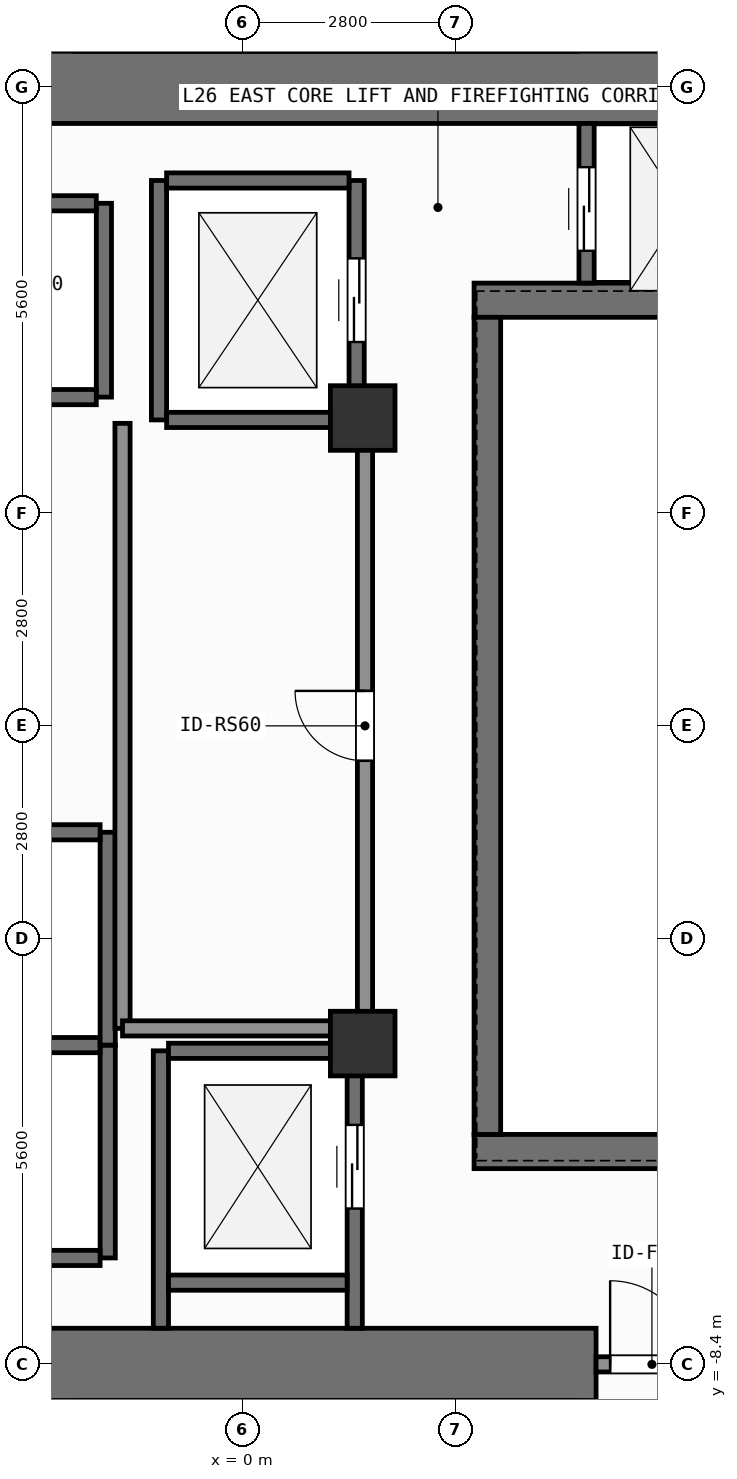
"""IFC4 building model, lengths in metres.
Left out: names, types, materials, properties, quantities, classifications, styles, units other than length and angle.
Written with IfcOpenShell. Run it as: python <this file> out.ifc"""

import sys

from ifc_helpers import new_model, si_unit, direction, frame, frame_2d, origin, origin_2d, place, context, subcontext, project, spatial, rectangle, extrude, element, fill, save


model = new_model("IFC4")
c1 = context("Model", 3, precision=1e-05, world=origin(), true_north=direction((0.0, 1.0)))
c2 = subcontext(c1, "Body", "Model", "MODEL_VIEW")
j1 = project(units=[si_unit("LENGTHUNIT", "METRE"), si_unit("PLANEANGLEUNIT", "RADIAN")], contexts=[c1])
p1 = place(None, origin())
s1 = spatial("IfcSite", under=j1, at=p1, CompositionType="ELEMENT")
p2 = place(p1, origin())
s2 = spatial("IfcBuilding", under=s1, at=p2, CompositionType="ELEMENT")
p3 = place(p2, frame((0.0, 0.0, 104.7)))
s3 = spatial("IfcBuildingStorey", under=s2, at=p3, CompositionType="ELEMENT", Elevation=104.7)
p4 = place(p3, frame((-2.62, -8.4, 0.0), z_axis=(0.0, 0.0, 1.0), x_axis=(1.0, 0.0, 0.0)))
e1 = element("IfcWall", 1, at=p4, inside=s3, PredefinedType="SHEAR", context=c2, shape_type="SweptSolid", body=[
    extrude(rectangle(XDim=7.27, YDim=0.95, at=frame_2d((3.635, 0.0))), origin(), (0.0, 0.0, 1.0), 3.9),
])
p5 = place(p3, frame((-7.55, 8.4, 0.0), z_axis=(0.0, 0.0, 1.0), x_axis=(1.0, 0.0, 0.0)))
e2 = element("IfcWall", 2, at=p5, inside=s3, PredefinedType="SHEAR", context=c2, shape_type="SweptSolid", body=[
    extrude(rectangle(XDim=16.425, YDim=0.95, at=frame_2d((8.212, 0.0))), origin(), (0.0, 0.0, 1.0), 3.9),
])
for number, where, z_axis, x_axis in (
    (3, (3.045, -5.6, 0.0), (0.0, 0.0, 1.0), (1.0, 0.0, 0.0)),
    (4, (3.045, 5.6, 0.0), (0.0, 0.0, 1.0), (1.0, 0.0, 0.0)),
):
    element("IfcWall", number, at=place(p3, frame(where, z_axis=z_axis, x_axis=x_axis)), inside=s3, PredefinedType="SHEAR", context=c2, shape_type="SweptSolid", body=[
        extrude(rectangle(XDim=5.83, YDim=0.45, at=frame_2d((2.915, 0.0))), origin(), (0.0, 0.0, 1.0), 3.9),
    ])
p6 = place(p3, frame((3.22, -5.375, 0.0), z_axis=(0.0, 0.0, 1.0), x_axis=(0.0, 1.0, 0.0)))
e5 = element("IfcWall", 5, at=p6, inside=s3, PredefinedType="SHEAR", context=c2, shape_type="SweptSolid", body=[
    extrude(rectangle(XDim=10.75, YDim=0.35, at=frame_2d((5.375, 0.0))), origin(), (0.0, 0.0, 1.0), 3.9),
])
for number, where, z_axis, x_axis in (
    (6, (1.58, -4.18, 0.0), (0.0, 0.0, 1.0), (1.0, 0.0, 0.0)),
    (7, (1.58, 4.05, 0.0), (0.0, 0.0, 1.0), (1.0, 0.0, 0.0)),
):
    element("IfcColumn", number, at=place(p3, frame(where, z_axis=z_axis, x_axis=x_axis)), inside=s3, PredefinedType="COLUMN", context=c2, shape_type="SweptSolid", body=[
        extrude(rectangle(XDim=0.85, YDim=0.85, at=origin_2d()), origin(), (0.0, 0.0, 1.0), 3.9),
    ])
p7 = place(p3, frame((-1.825, 4.325, 0.0), z_axis=(0.0, 0.0, 1.0), x_axis=(0.0, 1.0, 0.0)))
e8 = element("IfcWall", 8, at=p7, inside=s3, PredefinedType="SHEAR", context=c2, shape_type="SweptSolid", body=[
    extrude(rectangle(XDim=2.55, YDim=0.2, at=frame_2d((1.275, 0.0))), origin(), (0.0, 0.0, 1.0), 3.62),
])
for number, where, z_axis, x_axis in (
    (9, (-4.275, 4.325, 0.0), (0.0, 0.0, 1.0), (1.0, 0.0, 0.0)),
    (10, (-4.275, 6.875, 0.0), (0.0, 0.0, 1.0), (1.0, 0.0, 0.0)),
):
    element("IfcWall", number, at=place(p3, frame(where, z_axis=z_axis, x_axis=x_axis)), inside=s3, PredefinedType="SHEAR", context=c2, shape_type="SweptSolid", body=[
        extrude(rectangle(XDim=2.35, YDim=0.2, at=frame_2d((1.175, 0.0))), origin(), (0.0, 0.0, 1.0), 3.62),
    ])
p8 = place(p3, frame((-1.775, -7.0, 0.0), z_axis=(0.0, 0.0, 1.0), x_axis=(0.0, 1.0, 0.0)))
e11 = element("IfcWall", 11, at=p8, inside=s3, PredefinedType="SHEAR", context=c2, shape_type="SweptSolid", body=[
    extrude(rectangle(XDim=2.8, YDim=0.2, at=frame_2d((1.4, 0.0))), origin(), (0.0, 0.0, 1.0), 3.62),
])
for number, where, z_axis, x_axis in (
    (12, (-4.325, -7.0, 0.0), (0.0, 0.0, 1.0), (1.0, 0.0, 0.0)),
    (13, (-4.325, -4.2, 0.0), (0.0, 0.0, 1.0), (1.0, 0.0, 0.0)),
):
    element("IfcWall", number, at=place(p3, frame(where, z_axis=z_axis, x_axis=x_axis)), inside=s3, PredefinedType="SHEAR", context=c2, shape_type="SweptSolid", body=[
        extrude(rectangle(XDim=2.45, YDim=0.2, at=frame_2d((1.225, 0.0))), origin(), (0.0, 0.0, 1.0), 3.62),
    ])
p9 = place(p3, frame((-1.775, -4.2, 0.0), z_axis=(0.0, 0.0, 1.0), x_axis=(0.0, 1.0, 0.0)))
e14 = element("IfcWall", 14, at=p9, inside=s3, PredefinedType="SHEAR", context=c2, shape_type="SweptSolid", body=[
    extrude(rectangle(XDim=2.8, YDim=0.2, at=frame_2d((1.4, 0.0))), origin(), (0.0, 0.0, 1.0), 3.62),
])
p10 = place(p3, frame((-4.325, -1.4, 0.0), z_axis=(0.0, 0.0, 1.0), x_axis=(1.0, 0.0, 0.0)))
e15 = element("IfcWall", 15, at=p10, inside=s3, PredefinedType="SHEAR", context=c2, shape_type="SweptSolid", body=[
    extrude(rectangle(XDim=2.45, YDim=0.2, at=frame_2d((1.225, 0.0))), origin(), (0.0, 0.0, 1.0), 3.62),
])
p11 = place(p3, frame((-1.1, 4.025, 0.0), z_axis=(0.0, 0.0, 1.0), x_axis=(0.0, 1.0, 0.0)))
e16 = element("IfcWall", 16, at=p11, inside=s3, PredefinedType="SHEAR", context=c2, shape_type="SweptSolid", body=[
    extrude(rectangle(XDim=3.15, YDim=0.2, at=frame_2d((1.575, 0.0))), origin(), (0.0, 0.0, 1.0), 3.62),
])
p12 = place(p3, frame((1.5, 4.025, 0.0), z_axis=(0.0, 0.0, 1.0), x_axis=(0.0, 1.0, 0.0)))
e17 = element("IfcWall", 17, at=p12, inside=s3, PredefinedType="SHEAR", context=c2, shape_type="SweptSolid", body=[
    extrude(rectangle(XDim=3.15, YDim=0.2, at=frame_2d((1.575, 0.0))), origin(), (0.0, 0.0, 1.0), 3.62),
])
p13 = place(p12, frame((1.025, 0.0, 0.0)))
e18 = element("IfcOpeningElement", 18, at=p13, cuts=e17, PredefinedType="OPENING", context=c2, shape_type="SweptSolid", body=[
    extrude(rectangle(XDim=1.1, YDim=2.2, at=frame_2d((0.55, 1.1))), frame((0.0, 0.11, 0.0), z_axis=(0.0, -1.0, 0.0), x_axis=(1.0, 0.0, 0.0)), (0.0, 0.0, 1.0), 0.22),
])
for number, where, z_axis, x_axis in (
    (19, (-1.0, 4.025, 0.0), (0.0, 0.0, 1.0), (1.0, 0.0, 0.0)),
    (20, (-1.0, 7.175, 0.0), (0.0, 0.0, 1.0), (1.0, 0.0, 0.0)),
):
    element("IfcWall", number, at=place(p3, frame(where, z_axis=z_axis, x_axis=x_axis)), inside=s3, PredefinedType="SHEAR", context=c2, shape_type="SweptSolid", body=[
        extrude(rectangle(XDim=2.4, YDim=0.2, at=frame_2d((1.2, 0.0))), origin(), (0.0, 0.0, 1.0), 3.62),
    ])
p14 = place(p3, frame((-1.075, -7.925, 0.0), z_axis=(0.0, 0.0, 1.0), x_axis=(0.0, 1.0, 0.0)))
e21 = element("IfcWall", 21, at=p14, inside=s3, PredefinedType="SHEAR", context=c2, shape_type="SweptSolid", body=[
    extrude(rectangle(XDim=3.65, YDim=0.2, at=frame_2d((1.825, 0.0))), origin(), (0.0, 0.0, 1.0), 3.62),
])
p15 = place(p3, frame((1.475, -7.925, 0.0), z_axis=(0.0, 0.0, 1.0), x_axis=(0.0, 1.0, 0.0)))
e22 = element("IfcWall", 22, at=p15, inside=s3, PredefinedType="SHEAR", context=c2, shape_type="SweptSolid", body=[
    extrude(rectangle(XDim=3.65, YDim=0.2, at=frame_2d((1.825, 0.0))), origin(), (0.0, 0.0, 1.0), 3.62),
])
p16 = place(p15, frame((1.575, 0.0, 0.0)))
e23 = element("IfcOpeningElement", 23, at=p16, cuts=e22, PredefinedType="OPENING", context=c2, shape_type="SweptSolid", body=[
    extrude(rectangle(XDim=1.1, YDim=2.2, at=frame_2d((0.55, 1.1))), frame((0.0, 0.11, 0.0), z_axis=(0.0, -1.0, 0.0), x_axis=(1.0, 0.0, 0.0)), (0.0, 0.0, 1.0), 0.22),
])
for number, where, z_axis, x_axis in (
    (24, (-0.975, -7.325, 0.0), (0.0, 0.0, 1.0), (1.0, 0.0, 0.0)),
    (25, (-0.975, -4.275, 0.0), (0.0, 0.0, 1.0), (1.0, 0.0, 0.0)),
):
    element("IfcWall", number, at=place(p3, frame(where, z_axis=z_axis, x_axis=x_axis)), inside=s3, PredefinedType="SHEAR", context=c2, shape_type="SweptSolid", body=[
        extrude(rectangle(XDim=2.35, YDim=0.2, at=frame_2d((1.175, 0.0))), origin(), (0.0, 0.0, 1.0), 3.62),
    ])
p17 = place(p3, frame((4.525, 5.825, 0.0), z_axis=(0.0, 0.0, 1.0), x_axis=(0.0, 1.0, 0.0)))
e26 = element("IfcWall", 26, at=p17, inside=s3, PredefinedType="SHEAR", context=c2, shape_type="SweptSolid", body=[
    extrude(rectangle(XDim=2.1, YDim=0.2, at=frame_2d((1.05, 0.0))), origin(), (0.0, 0.0, 1.0), 3.62),
])
p18 = place(p17, frame((0.425, 0.0, 0.0)))
e27 = element("IfcOpeningElement", 27, at=p18, cuts=e26, PredefinedType="OPENING", context=c2, shape_type="SweptSolid", body=[
    extrude(rectangle(XDim=1.1, YDim=2.2, at=frame_2d((0.55, 1.1))), frame((0.0, 0.11, 0.0), z_axis=(0.0, -1.0, 0.0), x_axis=(1.0, 0.0, 0.0)), (0.0, 0.0, 1.0), 0.22),
])
p19 = place(p3, frame((4.65, -8.4, 0.0), z_axis=(0.0, 0.0, 1.0), x_axis=(1.0, 0.0, 0.0)))
e28 = element("IfcWall", 28, at=p19, inside=s3, PredefinedType="SOLIDWALL", context=c2, shape_type="SweptSolid", body=[
    extrude(rectangle(XDim=1.47, YDim=0.2, at=frame_2d((0.735, 0.0))), origin(), (0.0, 0.0, 1.0), 2.66),
])
p20 = place(p19, frame((0.185, 0.0, 0.0)))
e29 = element("IfcOpeningElement", 29, at=p20, cuts=e28, PredefinedType="OPENING", context=c2, shape_type="SweptSolid", body=[
    extrude(rectangle(XDim=1.1, YDim=2.15, at=frame_2d((0.55, 1.075))), frame((0.0, 0.11, 0.0), z_axis=(0.0, -1.0, 0.0), x_axis=(1.0, 0.0, 0.0)), (0.0, 0.0, 1.0), 0.22),
])
p21 = place(p3, frame((1.61, -3.98, 0.0), z_axis=(0.0, 0.0, 1.0), x_axis=(0.0, 1.0, 0.0)))
e30 = element("IfcWall", 30, at=p21, inside=s3, PredefinedType="SOLIDWALL", context=c2, shape_type="SweptSolid", body=[
    extrude(rectangle(XDim=7.96, YDim=0.2, at=frame_2d((3.98, 0.0))), origin(), (0.0, 0.0, 1.0), 3.62),
])
p22 = place(p21, frame((3.52, 0.0, 0.0)))
e31 = element("IfcOpeningElement", 31, at=p22, cuts=e30, PredefinedType="OPENING", context=c2, shape_type="SweptSolid", body=[
    extrude(rectangle(XDim=0.92, YDim=2.1, at=frame_2d((0.46, 1.05))), frame((0.0, 0.11, 0.0), z_axis=(0.0, -1.0, 0.0), x_axis=(1.0, 0.0, 0.0)), (0.0, 0.0, 1.0), 0.22),
])
p23 = place(p3, frame((-1.58, -3.98, 0.0), z_axis=(0.0, 0.0, 1.0), x_axis=(0.0, 1.0, 0.0)))
e32 = element("IfcWall", 32, at=p23, inside=s3, PredefinedType="SOLIDWALL", context=c2, shape_type="SweptSolid", body=[
    extrude(rectangle(XDim=7.96, YDim=0.2, at=frame_2d((3.98, 0.0))), origin(), (0.0, 0.0, 1.0), 3.62),
])
p24 = place(p3, frame((-1.58, -3.98, 0.0), z_axis=(0.0, 0.0, 1.0), x_axis=(1.0, 0.0, 0.0)))
e33 = element("IfcWall", 33, at=p24, inside=s3, PredefinedType="SOLIDWALL", context=c2, shape_type="SweptSolid", body=[
    extrude(rectangle(XDim=3.19, YDim=0.2, at=frame_2d((1.595, 0.0))), origin(), (0.0, 0.0, 1.0), 3.62),
])
p25 = place(p13, origin())
e34 = element("IfcDoor", 34, at=p25, inside=s3, OperationType="SLIDING_TO_LEFT", PredefinedType="DOOR", context=c2, shape_type="SweptSolid", body=[
    extrude(rectangle(XDim=1.1, YDim=2.2, at=frame_2d((0.55, 1.1))), frame((0.0, 0.025, 0.0), z_axis=(0.0, -1.0, 0.0), x_axis=(1.0, 0.0, 0.0)), (0.0, 0.0, 1.0), 0.05),
])
fill(e18, e34)
p26 = place(p16, origin())
e35 = element("IfcDoor", 35, at=p26, inside=s3, OperationType="SLIDING_TO_LEFT", PredefinedType="DOOR", context=c2, shape_type="SweptSolid", body=[
    extrude(rectangle(XDim=1.1, YDim=2.2, at=frame_2d((0.55, 1.1))), frame((0.0, 0.025, 0.0), z_axis=(0.0, -1.0, 0.0), x_axis=(1.0, 0.0, 0.0)), (0.0, 0.0, 1.0), 0.05),
])
fill(e23, e35)
p27 = place(p18, origin())
e36 = element("IfcDoor", 36, at=p27, inside=s3, OperationType="SLIDING_TO_LEFT", PredefinedType="DOOR", context=c2, shape_type="SweptSolid", body=[
    extrude(rectangle(XDim=1.1, YDim=2.2, at=frame_2d((0.55, 1.1))), frame((0.0, 0.025, 0.0), z_axis=(0.0, -1.0, 0.0), x_axis=(1.0, 0.0, 0.0)), (0.0, 0.0, 1.0), 0.05),
])
fill(e27, e36)
p28 = place(p20, origin())
e37 = element("IfcDoor", 37, at=p28, inside=s3, OperationType="SINGLE_SWING_LEFT", PredefinedType="DOOR", context=c2, shape_type="SweptSolid", body=[
    extrude(rectangle(XDim=1.1, YDim=2.15, at=frame_2d((0.55, 1.075))), frame((0.0, 0.025, 0.0), z_axis=(0.0, -1.0, 0.0), x_axis=(1.0, 0.0, 0.0)), (0.0, 0.0, 1.0), 0.05),
])
fill(e29, e37)
p29 = place(p22, origin())
e38 = element("IfcDoor", 38, at=p29, inside=s3, OperationType="SINGLE_SWING_RIGHT", PredefinedType="DOOR", context=c2, shape_type="SweptSolid", body=[
    extrude(rectangle(XDim=0.92, YDim=2.1, at=frame_2d((0.46, 1.05))), frame((0.0, 0.025, 0.0), z_axis=(0.0, -1.0, 0.0), x_axis=(1.0, 0.0, 0.0)), (0.0, 0.0, 1.0), 0.05),
])
fill(e31, e38)
save(model, sys.argv[1])
